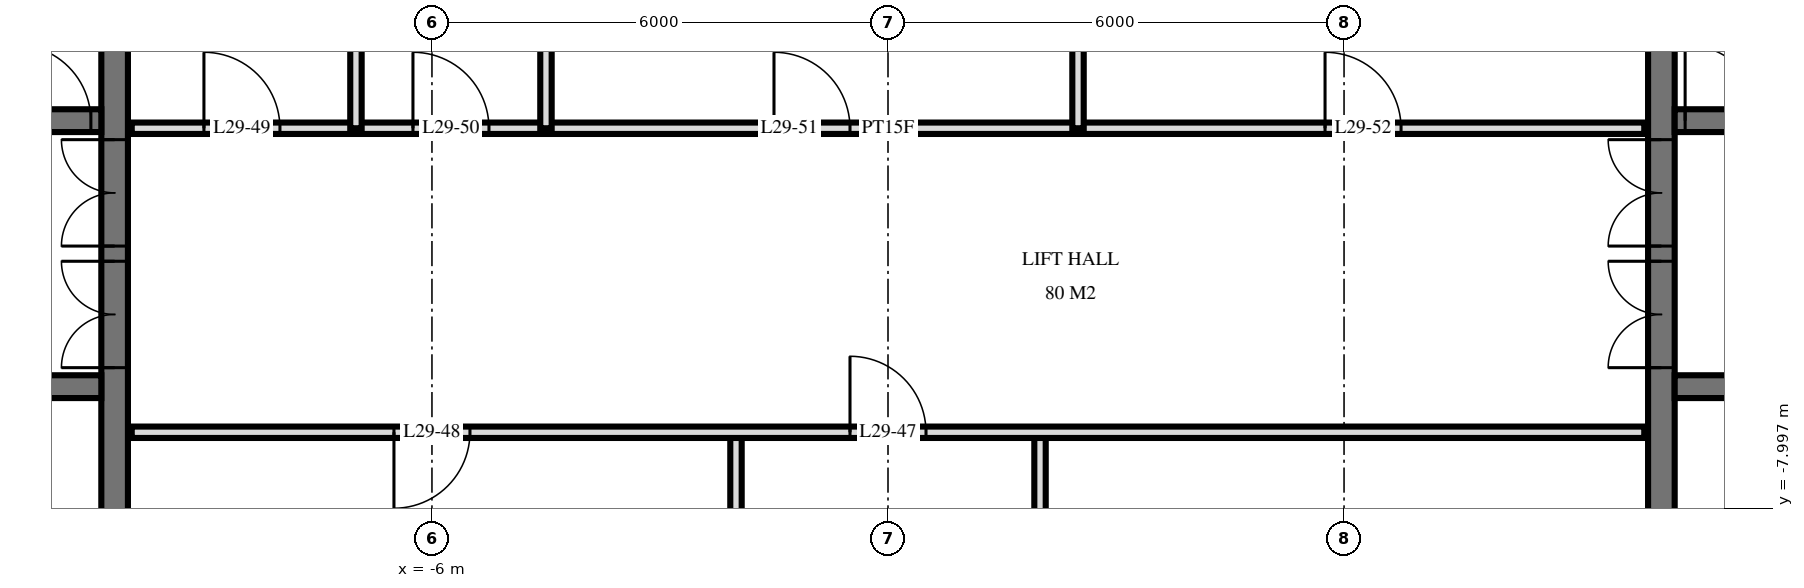
"""IFC4 building model, lengths in metres.
Left out: names, types, materials, properties, quantities, classifications, styles, units other than length and angle.
Written with IfcOpenShell. Run it as: python <this file> out.ifc"""

import sys

from ifc_helpers import new_model, si_unit, direction, frame, frame_2d, origin, place, context, subcontext, project, spatial, rectangle, extrude, element, fill, save


model = new_model("IFC4")
c1 = context("Model", 3, precision=1e-05, world=origin(), true_north=direction((0.0, 1.0)))
c2 = subcontext(c1, "Body", "Model", "MODEL_VIEW")
j1 = project(units=[si_unit("LENGTHUNIT", "METRE"), si_unit("PLANEANGLEUNIT", "RADIAN")], contexts=[c1])
p1 = place(None, origin())
s1 = spatial("IfcSite", under=j1, at=p1, CompositionType="ELEMENT")
p2 = place(p1, origin())
s2 = spatial("IfcBuilding", under=s1, at=p2, CompositionType="ELEMENT")
p3 = place(p2, frame((0.0, 0.0, 116.4)))
s3 = spatial("IfcBuildingStorey", under=s2, at=p3, CompositionType="ELEMENT", Elevation=116.4)
p4 = place(p3, frame((-10.175, -14.55, 0.0), z_axis=(0.0, 0.0, 1.0), x_axis=(0.0, 1.0, 0.0)))
e1 = element("IfcWall", 1, at=p4, inside=s3, PredefinedType="SHEAR", context=c2, shape_type="SweptSolid", body=[
    extrude(rectangle(XDim=14.1, YDim=0.35, at=frame_2d((7.05, 0.0))), origin(), (0.0, 0.0, 1.0), 3.6),
])
p5 = place(p4, frame((8.4, 0.0, 0.0)))
e2 = element("IfcOpeningElement", 2, at=p5, cuts=e1, PredefinedType="OPENING", context=c2, shape_type="SweptSolid", body=[
    extrude(rectangle(XDim=1.4, YDim=2.4, at=frame_2d((0.7, 1.2))), frame((0.0, 0.185, 0.0), z_axis=(0.0, -1.0, 0.0), x_axis=(1.0, 0.0, 0.0)), (0.0, 0.0, 1.0), 0.37),
])
p6 = place(p4, frame((10.0, 0.0, 0.0)))
e3 = element("IfcOpeningElement", 3, at=p6, cuts=e1, PredefinedType="OPENING", context=c2, shape_type="SweptSolid", body=[
    extrude(rectangle(XDim=1.4, YDim=2.4, at=frame_2d((0.7, 1.2))), frame((0.0, 0.185, 0.0), z_axis=(0.0, -1.0, 0.0), x_axis=(1.0, 0.0, 0.0)), (0.0, 0.0, 1.0), 0.37),
])
p7 = place(p4, frame((4.0, 0.0, 0.0)))
e4 = element("IfcOpeningElement", 4, at=p7, cuts=e1, PredefinedType="OPENING", context=c2, shape_type="SweptSolid", body=[
    extrude(rectangle(XDim=1.2, YDim=2.1, at=frame_2d((0.6, 1.05))), frame((0.0, 0.185, 0.0), z_axis=(0.0, -1.0, 0.0), x_axis=(1.0, 0.0, 0.0)), (0.0, 0.0, 1.0), 0.37),
])
p8 = place(p3, frame((-24.05, -2.9, 0.0), z_axis=(0.0, 0.0, 1.0), x_axis=(1.0, 0.0, 0.0)))
e5 = element("IfcWall", 5, at=p8, inside=s3, PredefinedType="SHEAR", context=c2, shape_type="SweptSolid", body=[
    extrude(rectangle(XDim=13.7, YDim=0.3, at=frame_2d((6.85, 0.0))), origin(), (0.0, 0.0, 1.0), 3.6),
])
p9 = place(p8, frame((0.55, 0.0, 0.0)))
e6 = element("IfcOpeningElement", 6, at=p9, cuts=e5, PredefinedType="OPENING", context=c2, shape_type="SweptSolid", body=[
    extrude(rectangle(XDim=1.1, YDim=2.1, at=frame_2d((0.55, 1.05))), frame((0.0, 0.16, 0.0), z_axis=(0.0, -1.0, 0.0), x_axis=(1.0, 0.0, 0.0)), (0.0, 0.0, 1.0), 0.32),
])
p10 = place(p8, frame((6.613, 0.0, 0.0)))
e7 = element("IfcOpeningElement", 7, at=p10, cuts=e5, PredefinedType="OPENING", context=c2, shape_type="SweptSolid", body=[
    extrude(rectangle(XDim=0.9, YDim=2.1, at=frame_2d((0.45, 1.05))), frame((0.0, 0.16, 0.0), z_axis=(0.0, -1.0, 0.0), x_axis=(1.0, 0.0, 0.0)), (0.0, 0.0, 1.0), 0.32),
])
p11 = place(p8, frame((5.188, 0.0, 0.0)))
e8 = element("IfcOpeningElement", 8, at=p11, cuts=e5, PredefinedType="OPENING", context=c2, shape_type="SweptSolid", body=[
    extrude(rectangle(XDim=0.9, YDim=2.1, at=frame_2d((0.45, 1.05))), frame((0.0, 0.16, 0.0), z_axis=(0.0, -1.0, 0.0), x_axis=(1.0, 0.0, 0.0)), (0.0, 0.0, 1.0), 0.32),
])
p12 = place(p8, frame((12.562, 0.0, 0.0)))
e9 = element("IfcOpeningElement", 9, at=p12, cuts=e5, PredefinedType="OPENING", context=c2, shape_type="SweptSolid", body=[
    extrude(rectangle(XDim=1.0, YDim=2.1, at=frame_2d((0.5, 1.05))), frame((0.0, 0.16, 0.0), z_axis=(0.0, -1.0, 0.0), x_axis=(1.0, 0.0, 0.0)), (0.0, 0.0, 1.0), 0.32),
])
p13 = place(p8, frame((11.137, 0.0, 0.0)))
e10 = element("IfcOpeningElement", 10, at=p13, cuts=e5, PredefinedType="OPENING", context=c2, shape_type="SweptSolid", body=[
    extrude(rectangle(XDim=1.0, YDim=2.1, at=frame_2d((0.5, 1.05))), frame((0.0, 0.16, 0.0), z_axis=(0.0, -1.0, 0.0), x_axis=(1.0, 0.0, 0.0)), (0.0, 0.0, 1.0), 0.32),
])
p14 = place(p8, frame((8.85, 0.0, 0.0)))
e11 = element("IfcOpeningElement", 11, at=p14, cuts=e5, PredefinedType="OPENING", context=c2, shape_type="SweptSolid", body=[
    extrude(rectangle(XDim=1.0, YDim=2.1, at=frame_2d((0.5, 1.05))), frame((0.0, 0.16, 0.0), z_axis=(0.0, -1.0, 0.0), x_axis=(1.0, 0.0, 0.0)), (0.0, 0.0, 1.0), 0.32),
])
p15 = place(p8, frame((3.0, 0.0, 0.0)))
e12 = element("IfcOpeningElement", 12, at=p15, cuts=e5, PredefinedType="OPENING", context=c2, shape_type="SweptSolid", body=[
    extrude(rectangle(XDim=1.0, YDim=2.1, at=frame_2d((0.5, 1.05))), frame((0.0, 0.16, 0.0), z_axis=(0.0, -1.0, 0.0), x_axis=(1.0, 0.0, 0.0)), (0.0, 0.0, 1.0), 0.32),
])
p16 = place(p3, frame((-24.05, -6.4, 0.0), z_axis=(0.0, 0.0, 1.0), x_axis=(1.0, 0.0, 0.0)))
e13 = element("IfcWall", 13, at=p16, inside=s3, PredefinedType="SHEAR", context=c2, shape_type="SweptSolid", body=[
    extrude(rectangle(XDim=13.7, YDim=0.3, at=frame_2d((6.85, 0.0))), origin(), (0.0, 0.0, 1.0), 3.6),
])
p17 = place(p16, frame((0.55, 0.0, 0.0)))
e14 = element("IfcOpeningElement", 14, at=p17, cuts=e13, PredefinedType="OPENING", context=c2, shape_type="SweptSolid", body=[
    extrude(rectangle(XDim=1.1, YDim=2.1, at=frame_2d((0.55, 1.05))), frame((0.0, 0.16, 0.0), z_axis=(0.0, -1.0, 0.0), x_axis=(1.0, 0.0, 0.0)), (0.0, 0.0, 1.0), 0.32),
])
p18 = place(p16, frame((5.8, 0.0, 0.0)))
e15 = element("IfcOpeningElement", 15, at=p18, cuts=e13, PredefinedType="OPENING", context=c2, shape_type="SweptSolid", body=[
    extrude(rectangle(XDim=1.1, YDim=2.1, at=frame_2d((0.55, 1.05))), frame((0.0, 0.16, 0.0), z_axis=(0.0, -1.0, 0.0), x_axis=(1.0, 0.0, 0.0)), (0.0, 0.0, 1.0), 0.32),
])
p19 = place(p3, frame((10.175, -14.55, 0.0), z_axis=(0.0, 0.0, 1.0), x_axis=(0.0, 1.0, 0.0)))
e16 = element("IfcWall", 16, at=p19, inside=s3, PredefinedType="SHEAR", context=c2, shape_type="SweptSolid", body=[
    extrude(rectangle(XDim=14.1, YDim=0.35, at=frame_2d((7.05, 0.0))), origin(), (0.0, 0.0, 1.0), 3.6),
])
p20 = place(p19, frame((8.4, 0.0, 0.0)))
e17 = element("IfcOpeningElement", 17, at=p20, cuts=e16, PredefinedType="OPENING", context=c2, shape_type="SweptSolid", body=[
    extrude(rectangle(XDim=1.4, YDim=2.4, at=frame_2d((0.7, 1.2))), frame((0.0, 0.185, 0.0), z_axis=(0.0, -1.0, 0.0), x_axis=(1.0, 0.0, 0.0)), (0.0, 0.0, 1.0), 0.37),
])
p21 = place(p19, frame((10.0, 0.0, 0.0)))
e18 = element("IfcOpeningElement", 18, at=p21, cuts=e16, PredefinedType="OPENING", context=c2, shape_type="SweptSolid", body=[
    extrude(rectangle(XDim=1.4, YDim=2.4, at=frame_2d((0.7, 1.2))), frame((0.0, 0.185, 0.0), z_axis=(0.0, -1.0, 0.0), x_axis=(1.0, 0.0, 0.0)), (0.0, 0.0, 1.0), 0.37),
])
p22 = place(p19, frame((4.0, 0.0, 0.0)))
e19 = element("IfcOpeningElement", 19, at=p22, cuts=e16, PredefinedType="OPENING", context=c2, shape_type="SweptSolid", body=[
    extrude(rectangle(XDim=1.2, YDim=2.1, at=frame_2d((0.6, 1.05))), frame((0.0, 0.185, 0.0), z_axis=(0.0, -1.0, 0.0), x_axis=(1.0, 0.0, 0.0)), (0.0, 0.0, 1.0), 0.37),
])
p23 = place(p3, frame((10.35, -2.9, 0.0), z_axis=(0.0, 0.0, 1.0), x_axis=(1.0, 0.0, 0.0)))
e20 = element("IfcWall", 20, at=p23, inside=s3, PredefinedType="SHEAR", context=c2, shape_type="SweptSolid", body=[
    extrude(rectangle(XDim=13.7, YDim=0.3, at=frame_2d((6.85, 0.0))), origin(), (0.0, 0.0, 1.0), 3.6),
])
p24 = place(p23, frame((12.05, 0.0, 0.0)))
e21 = element("IfcOpeningElement", 21, at=p24, cuts=e20, PredefinedType="OPENING", context=c2, shape_type="SweptSolid", body=[
    extrude(rectangle(XDim=1.1, YDim=2.1, at=frame_2d((0.55, 1.05))), frame((0.0, 0.16, 0.0), z_axis=(0.0, -1.0, 0.0), x_axis=(1.0, 0.0, 0.0)), (0.0, 0.0, 1.0), 0.32),
])
p25 = place(p23, frame((6.188, 0.0, 0.0)))
e22 = element("IfcOpeningElement", 22, at=p25, cuts=e20, PredefinedType="OPENING", context=c2, shape_type="SweptSolid", body=[
    extrude(rectangle(XDim=0.9, YDim=2.1, at=frame_2d((0.45, 1.05))), frame((0.0, 0.16, 0.0), z_axis=(0.0, -1.0, 0.0), x_axis=(1.0, 0.0, 0.0)), (0.0, 0.0, 1.0), 0.32),
])
p26 = place(p23, frame((7.613, 0.0, 0.0)))
e23 = element("IfcOpeningElement", 23, at=p26, cuts=e20, PredefinedType="OPENING", context=c2, shape_type="SweptSolid", body=[
    extrude(rectangle(XDim=0.9, YDim=2.1, at=frame_2d((0.45, 1.05))), frame((0.0, 0.16, 0.0), z_axis=(0.0, -1.0, 0.0), x_axis=(1.0, 0.0, 0.0)), (0.0, 0.0, 1.0), 0.32),
])
p27 = place(p23, frame((0.137, 0.0, 0.0)))
e24 = element("IfcOpeningElement", 24, at=p27, cuts=e20, PredefinedType="OPENING", context=c2, shape_type="SweptSolid", body=[
    extrude(rectangle(XDim=1.0, YDim=2.1, at=frame_2d((0.5, 1.05))), frame((0.0, 0.16, 0.0), z_axis=(0.0, -1.0, 0.0), x_axis=(1.0, 0.0, 0.0)), (0.0, 0.0, 1.0), 0.32),
])
p28 = place(p23, frame((1.562, 0.0, 0.0)))
e25 = element("IfcOpeningElement", 25, at=p28, cuts=e20, PredefinedType="OPENING", context=c2, shape_type="SweptSolid", body=[
    extrude(rectangle(XDim=1.0, YDim=2.1, at=frame_2d((0.5, 1.05))), frame((0.0, 0.16, 0.0), z_axis=(0.0, -1.0, 0.0), x_axis=(1.0, 0.0, 0.0)), (0.0, 0.0, 1.0), 0.32),
])
p29 = place(p23, frame((3.85, 0.0, 0.0)))
e26 = element("IfcOpeningElement", 26, at=p29, cuts=e20, PredefinedType="OPENING", context=c2, shape_type="SweptSolid", body=[
    extrude(rectangle(XDim=1.0, YDim=2.1, at=frame_2d((0.5, 1.05))), frame((0.0, 0.16, 0.0), z_axis=(0.0, -1.0, 0.0), x_axis=(1.0, 0.0, 0.0)), (0.0, 0.0, 1.0), 0.32),
])
p30 = place(p23, frame((9.7, 0.0, 0.0)))
e27 = element("IfcOpeningElement", 27, at=p30, cuts=e20, PredefinedType="OPENING", context=c2, shape_type="SweptSolid", body=[
    extrude(rectangle(XDim=1.0, YDim=2.1, at=frame_2d((0.5, 1.05))), frame((0.0, 0.16, 0.0), z_axis=(0.0, -1.0, 0.0), x_axis=(1.0, 0.0, 0.0)), (0.0, 0.0, 1.0), 0.32),
])
p31 = place(p3, frame((10.35, -6.4, 0.0), z_axis=(0.0, 0.0, 1.0), x_axis=(1.0, 0.0, 0.0)))
e28 = element("IfcWall", 28, at=p31, inside=s3, PredefinedType="SHEAR", context=c2, shape_type="SweptSolid", body=[
    extrude(rectangle(XDim=13.7, YDim=0.3, at=frame_2d((6.85, 0.0))), origin(), (0.0, 0.0, 1.0), 3.6),
])
p32 = place(p31, frame((12.05, 0.0, 0.0)))
e29 = element("IfcOpeningElement", 29, at=p32, cuts=e28, PredefinedType="OPENING", context=c2, shape_type="SweptSolid", body=[
    extrude(rectangle(XDim=1.1, YDim=2.1, at=frame_2d((0.55, 1.05))), frame((0.0, 0.16, 0.0), z_axis=(0.0, -1.0, 0.0), x_axis=(1.0, 0.0, 0.0)), (0.0, 0.0, 1.0), 0.32),
])
p33 = place(p31, frame((6.8, 0.0, 0.0)))
e30 = element("IfcOpeningElement", 30, at=p33, cuts=e28, PredefinedType="OPENING", context=c2, shape_type="SweptSolid", body=[
    extrude(rectangle(XDim=1.1, YDim=2.1, at=frame_2d((0.55, 1.05))), frame((0.0, 0.16, 0.0), z_axis=(0.0, -1.0, 0.0), x_axis=(1.0, 0.0, 0.0)), (0.0, 0.0, 1.0), 0.32),
])
p34 = place(p3, frame((2.5, -3.0, 0.0), z_axis=(0.0, 0.0, 1.0), x_axis=(0.0, 1.0, 0.0)))
e31 = element("IfcWall", 31, at=p34, inside=s3, PredefinedType="PARTITIONING", context=c2, shape_type="SweptSolid", body=[
    extrude(rectangle(XDim=4.02, YDim=0.15, at=frame_2d((2.01, 0.0))), origin(), (0.0, 0.0, 1.0), 3.32),
])
for number, where, z_axis, x_axis in (
    (32, (2.0, -11.0, 0.0), (0.0, 0.0, 1.0), (0.0, 1.0, 0.0)),
    (33, (-2.0, -11.0, 0.0), (0.0, 0.0, 1.0), (0.0, 1.0, 0.0)),
):
    element("IfcWall", number, at=place(p3, frame(where, z_axis=z_axis, x_axis=x_axis)), inside=s3, PredefinedType="PARTITIONING", context=c2, shape_type="SweptSolid", body=[
        extrude(rectangle(XDim=4.0, YDim=0.15, at=frame_2d((2.0, 0.0))), origin(), (0.0, 0.0, 1.0), 3.32),
    ])
for number, where, z_axis, x_axis in (
    (34, (-4.5, -3.0, 0.0), (0.0, 0.0, 1.0), (0.0, 1.0, 0.0)),
    (35, (-7.0, -3.0, 0.0), (0.0, 0.0, 1.0), (0.0, 1.0, 0.0)),
):
    element("IfcWall", number, at=place(p3, frame(where, z_axis=z_axis, x_axis=x_axis)), inside=s3, PredefinedType="PLUMBINGWALL", context=c2, shape_type="SweptSolid", body=[
        extrude(rectangle(XDim=4.02, YDim=0.15, at=frame_2d((2.01, 0.0))), origin(), (0.0, 0.0, 1.0), 3.32),
    ])
p35 = place(p3, frame((-9.95, -7.0, 0.0), z_axis=(0.0, 0.0, 1.0), x_axis=(1.0, 0.0, 0.0)))
e36 = element("IfcWall", 36, at=p35, inside=s3, PredefinedType="PARTITIONING", context=c2, shape_type="SweptSolid", body=[
    extrude(rectangle(XDim=19.9, YDim=0.15, at=frame_2d((9.95, 0.0))), origin(), (0.0, 0.0, 1.0), 3.32),
])
p36 = place(p35, frame((9.45, 0.0, 0.0)))
e37 = element("IfcOpeningElement", 37, at=p36, cuts=e36, PredefinedType="OPENING", context=c2, shape_type="SweptSolid", body=[
    extrude(rectangle(XDim=1.0, YDim=2.1, at=frame_2d((0.5, 1.05))), frame((0.0, 0.085, 0.0), z_axis=(0.0, -1.0, 0.0), x_axis=(1.0, 0.0, 0.0)), (0.0, 0.0, 1.0), 0.17),
])
p37 = place(p35, frame((3.45, 0.0, 0.0)))
e38 = element("IfcOpeningElement", 38, at=p37, cuts=e36, PredefinedType="OPENING", context=c2, shape_type="SweptSolid", body=[
    extrude(rectangle(XDim=1.0, YDim=2.1, at=frame_2d((0.5, 1.05))), frame((0.0, 0.085, 0.0), z_axis=(0.0, -1.0, 0.0), x_axis=(1.0, 0.0, 0.0)), (0.0, 0.0, 1.0), 0.17),
])
p38 = place(p3, frame((-9.95, -3.0, 0.0), z_axis=(0.0, 0.0, 1.0), x_axis=(1.0, 0.0, 0.0)))
e39 = element("IfcWall", 39, at=p38, inside=s3, PredefinedType="PARTITIONING", context=c2, shape_type="SweptSolid", body=[
    extrude(rectangle(XDim=19.9, YDim=0.15, at=frame_2d((9.95, 0.0))), origin(), (0.0, 0.0, 1.0), 3.32),
])
p39 = place(p38, frame((0.95, 0.0, 0.0)))
e40 = element("IfcOpeningElement", 40, at=p39, cuts=e39, PredefinedType="OPENING", context=c2, shape_type="SweptSolid", body=[
    extrude(rectangle(XDim=1.0, YDim=2.1, at=frame_2d((0.5, 1.05))), frame((0.0, 0.085, 0.0), z_axis=(0.0, -1.0, 0.0), x_axis=(1.0, 0.0, 0.0)), (0.0, 0.0, 1.0), 0.17),
])
p40 = place(p38, frame((3.7, 0.0, 0.0)))
e41 = element("IfcOpeningElement", 41, at=p40, cuts=e39, PredefinedType="OPENING", context=c2, shape_type="SweptSolid", body=[
    extrude(rectangle(XDim=1.0, YDim=2.1, at=frame_2d((0.5, 1.05))), frame((0.0, 0.085, 0.0), z_axis=(0.0, -1.0, 0.0), x_axis=(1.0, 0.0, 0.0)), (0.0, 0.0, 1.0), 0.17),
])
p41 = place(p38, frame((8.45, 0.0, 0.0)))
e42 = element("IfcOpeningElement", 42, at=p41, cuts=e39, PredefinedType="OPENING", context=c2, shape_type="SweptSolid", body=[
    extrude(rectangle(XDim=1.0, YDim=2.1, at=frame_2d((0.5, 1.05))), frame((0.0, 0.085, 0.0), z_axis=(0.0, -1.0, 0.0), x_axis=(1.0, 0.0, 0.0)), (0.0, 0.0, 1.0), 0.17),
])
p42 = place(p38, frame((15.7, 0.0, 0.0)))
e43 = element("IfcOpeningElement", 43, at=p42, cuts=e39, PredefinedType="OPENING", context=c2, shape_type="SweptSolid", body=[
    extrude(rectangle(XDim=1.0, YDim=2.1, at=frame_2d((0.5, 1.05))), frame((0.0, 0.085, 0.0), z_axis=(0.0, -1.0, 0.0), x_axis=(1.0, 0.0, 0.0)), (0.0, 0.0, 1.0), 0.17),
])
p43 = place(p5, origin())
e44 = element("IfcDoor", 44, at=p43, inside=s3, OperationType="DOUBLE_DOOR_SINGLE_SWING", PredefinedType="DOOR", context=c2, shape_type="SweptSolid", body=[
    extrude(rectangle(XDim=1.4, YDim=2.4, at=frame_2d((0.7, 1.2))), frame((0.0, 0.025, 0.0), z_axis=(0.0, -1.0, 0.0), x_axis=(1.0, 0.0, 0.0)), (0.0, 0.0, 1.0), 0.05),
])
fill(e2, e44)
p44 = place(p6, origin())
e45 = element("IfcDoor", 45, at=p44, inside=s3, OperationType="DOUBLE_DOOR_SINGLE_SWING", PredefinedType="DOOR", context=c2, shape_type="SweptSolid", body=[
    extrude(rectangle(XDim=1.4, YDim=2.4, at=frame_2d((0.7, 1.2))), frame((0.0, 0.025, 0.0), z_axis=(0.0, -1.0, 0.0), x_axis=(1.0, 0.0, 0.0)), (0.0, 0.0, 1.0), 0.05),
])
fill(e3, e45)
p45 = place(p12, origin())
e46 = element("IfcDoor", 46, at=p45, inside=s3, OperationType="SINGLE_SWING_RIGHT", PredefinedType="DOOR", context=c2, shape_type="SweptSolid", body=[
    extrude(rectangle(XDim=1.0, YDim=2.1, at=frame_2d((0.5, 1.05))), frame((0.0, 0.025, 0.0), z_axis=(0.0, -1.0, 0.0), x_axis=(1.0, 0.0, 0.0)), (0.0, 0.0, 1.0), 0.05),
])
fill(e9, e46)
p46 = place(p20, origin())
e47 = element("IfcDoor", 47, at=p46, inside=s3, OperationType="DOUBLE_DOOR_SINGLE_SWING", PredefinedType="DOOR", context=c2, shape_type="SweptSolid", body=[
    extrude(rectangle(XDim=1.4, YDim=2.4, at=frame_2d((0.7, 1.2))), frame((0.0, 0.025, 0.0), z_axis=(0.0, -1.0, 0.0), x_axis=(1.0, 0.0, 0.0)), (0.0, 0.0, 1.0), 0.05),
])
fill(e17, e47)
p47 = place(p21, origin())
e48 = element("IfcDoor", 48, at=p47, inside=s3, OperationType="DOUBLE_DOOR_SINGLE_SWING", PredefinedType="DOOR", context=c2, shape_type="SweptSolid", body=[
    extrude(rectangle(XDim=1.4, YDim=2.4, at=frame_2d((0.7, 1.2))), frame((0.0, 0.025, 0.0), z_axis=(0.0, -1.0, 0.0), x_axis=(1.0, 0.0, 0.0)), (0.0, 0.0, 1.0), 0.05),
])
fill(e18, e48)
p48 = place(p27, origin())
e49 = element("IfcDoor", 49, at=p48, inside=s3, OperationType="SINGLE_SWING_RIGHT", PredefinedType="DOOR", context=c2, shape_type="SweptSolid", body=[
    extrude(rectangle(XDim=1.0, YDim=2.1, at=frame_2d((0.5, 1.05))), frame((0.0, 0.025, 0.0), z_axis=(0.0, -1.0, 0.0), x_axis=(1.0, 0.0, 0.0)), (0.0, 0.0, 1.0), 0.05),
])
fill(e24, e49)
p49 = place(p36, origin())
e50 = element("IfcDoor", 50, at=p49, inside=s3, OperationType="SINGLE_SWING_RIGHT", PredefinedType="DOOR", context=c2, shape_type="SweptSolid", body=[
    extrude(rectangle(XDim=1.0, YDim=2.1, at=frame_2d((0.5, 1.05))), frame((0.0, 0.025, 0.0), z_axis=(0.0, -1.0, 0.0), x_axis=(1.0, 0.0, 0.0)), (0.0, 0.0, 1.0), 0.05),
])
fill(e37, e50)
p50 = place(p37, frame((0.5, 0.0, 0.0), z_axis=(0.0, 0.0, 1.0), x_axis=(-1.0, 0.0, 0.0)))
e51 = element("IfcDoor", 51, at=p50, inside=s3, OperationType="SINGLE_SWING_LEFT", PredefinedType="DOOR", context=c2, shape_type="SweptSolid", body=[
    extrude(rectangle(XDim=1.0, YDim=2.1, at=frame_2d((0.0, 1.05))), frame((0.0, -0.025, 0.0), z_axis=(0.0, 1.0, 0.0), x_axis=(-1.0, 0.0, 0.0)), (0.0, 0.0, 1.0), 0.05),
])
fill(e38, e51)
p51 = place(p39, origin())
e52 = element("IfcDoor", 52, at=p51, inside=s3, OperationType="SINGLE_SWING_RIGHT", PredefinedType="DOOR", context=c2, shape_type="SweptSolid", body=[
    extrude(rectangle(XDim=1.0, YDim=2.1, at=frame_2d((0.5, 1.05))), frame((0.0, 0.025, 0.0), z_axis=(0.0, -1.0, 0.0), x_axis=(1.0, 0.0, 0.0)), (0.0, 0.0, 1.0), 0.05),
])
fill(e40, e52)
p52 = place(p40, origin())
e53 = element("IfcDoor", 53, at=p52, inside=s3, OperationType="SINGLE_SWING_RIGHT", PredefinedType="DOOR", context=c2, shape_type="SweptSolid", body=[
    extrude(rectangle(XDim=1.0, YDim=2.1, at=frame_2d((0.5, 1.05))), frame((0.0, 0.025, 0.0), z_axis=(0.0, -1.0, 0.0), x_axis=(1.0, 0.0, 0.0)), (0.0, 0.0, 1.0), 0.05),
])
fill(e41, e53)
p53 = place(p41, origin())
e54 = element("IfcDoor", 54, at=p53, inside=s3, OperationType="SINGLE_SWING_RIGHT", PredefinedType="DOOR", context=c2, shape_type="SweptSolid", body=[
    extrude(rectangle(XDim=1.0, YDim=2.1, at=frame_2d((0.5, 1.05))), frame((0.0, 0.025, 0.0), z_axis=(0.0, -1.0, 0.0), x_axis=(1.0, 0.0, 0.0)), (0.0, 0.0, 1.0), 0.05),
])
fill(e42, e54)
p54 = place(p42, origin())
e55 = element("IfcDoor", 55, at=p54, inside=s3, OperationType="SINGLE_SWING_RIGHT", PredefinedType="DOOR", context=c2, shape_type="SweptSolid", body=[
    extrude(rectangle(XDim=1.0, YDim=2.1, at=frame_2d((0.5, 1.05))), frame((0.0, 0.025, 0.0), z_axis=(0.0, -1.0, 0.0), x_axis=(1.0, 0.0, 0.0)), (0.0, 0.0, 1.0), 0.05),
])
fill(e43, e55)
save(model, sys.argv[1])
